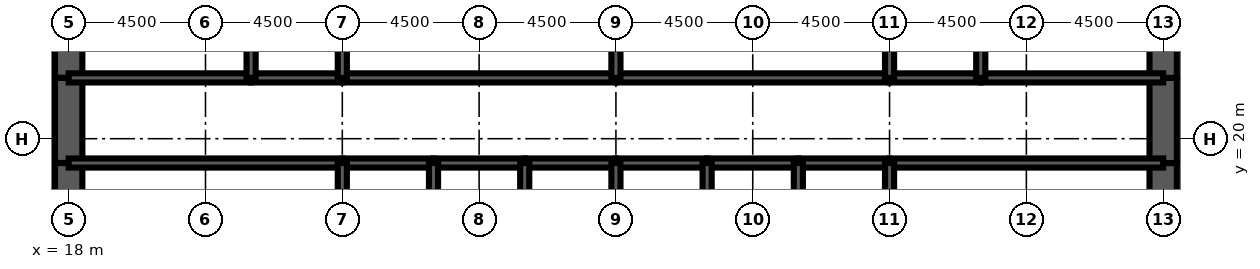
"""IFC4 building model, lengths in metres.
Left out: names, types, materials, properties, quantities, classifications, styles, units other than length and angle.
Written with IfcOpenShell. Run it as: python <this file> out.ifc"""

import sys

from ifc_helpers import new_model, si_unit, direction, frame, frame_2d, origin, place, context, subcontext, project, spatial, rectangle, extrude, element, fill, save


model = new_model("IFC4")
c1 = context("Model", 3, precision=1e-05, world=origin(), true_north=direction((0.0, 1.0)))
c2 = subcontext(c1, "Body", "Model", "MODEL_VIEW")
j1 = project(units=[si_unit("LENGTHUNIT", "METRE"), si_unit("PLANEANGLEUNIT", "RADIAN")], contexts=[c1])
p1 = place(None, origin())
s1 = spatial("IfcSite", under=j1, at=p1, CompositionType="ELEMENT")
p2 = place(p1, origin())
s2 = spatial("IfcBuilding", under=s1, at=p2, CompositionType="ELEMENT")
p3 = place(p2, frame((0.0, 0.0, 72.5)))
s3 = spatial("IfcBuildingStorey", under=s2, at=p3, CompositionType="ELEMENT", Elevation=72.5)
p4 = place(p3, frame((18.0, 26.0, 0.0), z_axis=(0.0, 0.0, 1.0), x_axis=(0.0, -1.0, 0.0)))
e1 = element("IfcWall", 1, at=p4, inside=s3, PredefinedType="SHEAR", context=c2, shape_type="SweptSolid", body=[
    extrude(rectangle(XDim=4.0, YDim=0.9, at=frame_2d((2.0, 0.0))), origin(), (0.0, 0.0, 1.0), 4.5),
])
p5 = place(p3, frame((18.0, 22.0, 0.0), z_axis=(0.0, 0.0, 1.0), x_axis=(0.0, -1.0, 0.0)))
e2 = element("IfcWall", 2, at=p5, inside=s3, PredefinedType="SHEAR", context=c2, shape_type="SweptSolid", body=[
    extrude(rectangle(XDim=2.8, YDim=0.9, at=frame_2d((1.4, 0.0))), origin(), (0.0, 0.0, 1.0), 4.5),
])
p6 = place(p5, frame((0.6, 0.0, 0.0)))
e3 = element("IfcOpeningElement", 3, at=p6, cuts=e2, PredefinedType="OPENING", context=c2, shape_type="SweptSolid", body=[
    extrude(rectangle(XDim=1.8, YDim=2.1, at=frame_2d((0.9, 1.05))), frame((0.0, 0.46, 0.0), z_axis=(0.0, -1.0, 0.0), x_axis=(1.0, 0.0, 0.0)), (0.0, 0.0, 1.0), 0.92),
])
for number, where, z_axis, x_axis in (
    (4, (18.0, 19.2, 0.0), (0.0, 0.0, 1.0), (0.0, -1.0, 0.0)),
    (5, (54.0, 16.0, 0.0), (0.0, 0.0, 1.0), (0.0, 1.0, 0.0)),
):
    element("IfcWall", number, at=place(p3, frame(where, z_axis=z_axis, x_axis=x_axis)), inside=s3, PredefinedType="SHEAR", context=c2, shape_type="SweptSolid", body=[
        extrude(rectangle(XDim=3.2, YDim=0.9, at=frame_2d((1.6, 0.0))), origin(), (0.0, 0.0, 1.0), 4.5),
    ])
p7 = place(p3, frame((54.0, 19.2, 0.0), z_axis=(0.0, 0.0, 1.0), x_axis=(0.0, 1.0, 0.0)))
e6 = element("IfcWall", 6, at=p7, inside=s3, PredefinedType="SHEAR", context=c2, shape_type="SweptSolid", body=[
    extrude(rectangle(XDim=2.8, YDim=0.9, at=frame_2d((1.4, 0.0))), origin(), (0.0, 0.0, 1.0), 4.5),
])
p8 = place(p7, frame((0.4, 0.0, 0.0)))
e7 = element("IfcOpeningElement", 7, at=p8, cuts=e6, PredefinedType="OPENING", context=c2, shape_type="SweptSolid", body=[
    extrude(rectangle(XDim=1.8, YDim=2.1, at=frame_2d((0.9, 1.05))), frame((0.0, 0.46, 0.0), z_axis=(0.0, -1.0, 0.0), x_axis=(1.0, 0.0, 0.0)), (0.0, 0.0, 1.0), 0.92),
])
p9 = place(p3, frame((54.0, 22.0, 0.0), z_axis=(0.0, 0.0, 1.0), x_axis=(0.0, 1.0, 0.0)))
e8 = element("IfcWall", 8, at=p9, inside=s3, PredefinedType="SHEAR", context=c2, shape_type="SweptSolid", body=[
    extrude(rectangle(XDim=4.0, YDim=0.9, at=frame_2d((2.0, 0.0))), origin(), (0.0, 0.0, 1.0), 4.5),
])
p10 = place(p3, frame((18.0, 19.2, 0.0), z_axis=(0.0, 0.0, 1.0), x_axis=(1.0, 0.0, 0.0)))
e9 = element("IfcWall", 9, at=p10, inside=s3, PredefinedType="SOLIDWALL", context=c2, shape_type="SweptSolid", body=[
    extrude(rectangle(XDim=9.0, YDim=0.3, at=frame_2d((4.5, 0.0))), origin(), (0.0, 0.0, 1.0), 4.5),
])
p11 = place(p10, frame((0.65, 0.0, 0.0)))
e10 = element("IfcOpeningElement", 10, at=p11, cuts=e9, PredefinedType="OPENING", context=c2, shape_type="SweptSolid", body=[
    extrude(rectangle(XDim=1.0, YDim=2.1, at=frame_2d((0.5, 1.05))), frame((0.0, 0.16, 0.0), z_axis=(0.0, -1.0, 0.0), x_axis=(1.0, 0.0, 0.0)), (0.0, 0.0, 1.0), 0.32),
])
p12 = place(p3, frame((27.0, 19.2, 0.0), z_axis=(0.0, 0.0, 1.0), x_axis=(1.0, 0.0, 0.0)))
e11 = element("IfcWall", 11, at=p12, inside=s3, PredefinedType="SOLIDWALL", context=c2, shape_type="SweptSolid", body=[
    extrude(rectangle(XDim=3.0, YDim=0.3, at=frame_2d((1.5, 0.0))), origin(), (0.0, 0.0, 1.0), 4.5),
])
p13 = place(p12, frame((0.95, 0.0, 0.0)))
e12 = element("IfcOpeningElement", 12, at=p13, cuts=e11, PredefinedType="OPENING", context=c2, shape_type="SweptSolid", body=[
    extrude(rectangle(XDim=1.1, YDim=2.2, at=frame_2d((0.55, 1.1))), frame((0.0, 0.16, 0.0), z_axis=(0.0, -1.0, 0.0), x_axis=(1.0, 0.0, 0.0)), (0.0, 0.0, 1.0), 0.32),
])
p14 = place(p3, frame((30.0, 19.2, 0.0), z_axis=(0.0, 0.0, 1.0), x_axis=(1.0, 0.0, 0.0)))
e13 = element("IfcWall", 13, at=p14, inside=s3, PredefinedType="SOLIDWALL", context=c2, shape_type="SweptSolid", body=[
    extrude(rectangle(XDim=3.0, YDim=0.3, at=frame_2d((1.5, 0.0))), origin(), (0.0, 0.0, 1.0), 4.5),
])
p15 = place(p14, frame((0.95, 0.0, 0.0)))
e14 = element("IfcOpeningElement", 14, at=p15, cuts=e13, PredefinedType="OPENING", context=c2, shape_type="SweptSolid", body=[
    extrude(rectangle(XDim=1.1, YDim=2.2, at=frame_2d((0.55, 1.1))), frame((0.0, 0.16, 0.0), z_axis=(0.0, -1.0, 0.0), x_axis=(1.0, 0.0, 0.0)), (0.0, 0.0, 1.0), 0.32),
])
p16 = place(p3, frame((33.0, 19.2, 0.0), z_axis=(0.0, 0.0, 1.0), x_axis=(1.0, 0.0, 0.0)))
e15 = element("IfcWall", 15, at=p16, inside=s3, PredefinedType="SOLIDWALL", context=c2, shape_type="SweptSolid", body=[
    extrude(rectangle(XDim=3.0, YDim=0.3, at=frame_2d((1.5, 0.0))), origin(), (0.0, 0.0, 1.0), 4.5),
])
p17 = place(p16, frame((0.95, 0.0, 0.0)))
e16 = element("IfcOpeningElement", 16, at=p17, cuts=e15, PredefinedType="OPENING", context=c2, shape_type="SweptSolid", body=[
    extrude(rectangle(XDim=1.1, YDim=2.2, at=frame_2d((0.55, 1.1))), frame((0.0, 0.16, 0.0), z_axis=(0.0, -1.0, 0.0), x_axis=(1.0, 0.0, 0.0)), (0.0, 0.0, 1.0), 0.32),
])
p18 = place(p3, frame((36.0, 19.2, 0.0), z_axis=(0.0, 0.0, 1.0), x_axis=(1.0, 0.0, 0.0)))
e17 = element("IfcWall", 17, at=p18, inside=s3, PredefinedType="SOLIDWALL", context=c2, shape_type="SweptSolid", body=[
    extrude(rectangle(XDim=3.0, YDim=0.3, at=frame_2d((1.5, 0.0))), origin(), (0.0, 0.0, 1.0), 4.5),
])
p19 = place(p18, frame((0.95, 0.0, 0.0)))
e18 = element("IfcOpeningElement", 18, at=p19, cuts=e17, PredefinedType="OPENING", context=c2, shape_type="SweptSolid", body=[
    extrude(rectangle(XDim=1.1, YDim=2.2, at=frame_2d((0.55, 1.1))), frame((0.0, 0.16, 0.0), z_axis=(0.0, -1.0, 0.0), x_axis=(1.0, 0.0, 0.0)), (0.0, 0.0, 1.0), 0.32),
])
for number, where, z_axis, x_axis in (
    (19, (39.0, 19.2, 0.0), (0.0, 0.0, 1.0), (1.0, 0.0, 0.0)),
    (20, (42.0, 19.2, 0.0), (0.0, 0.0, 1.0), (1.0, 0.0, 0.0)),
):
    element("IfcWall", number, at=place(p3, frame(where, z_axis=z_axis, x_axis=x_axis)), inside=s3, PredefinedType="SOLIDWALL", context=c2, shape_type="SweptSolid", body=[
        extrude(rectangle(XDim=3.0, YDim=0.3, at=frame_2d((1.5, 0.0))), origin(), (0.0, 0.0, 1.0), 4.5),
    ])
p20 = place(p3, frame((45.0, 19.2, 0.0), z_axis=(0.0, 0.0, 1.0), x_axis=(1.0, 0.0, 0.0)))
e21 = element("IfcWall", 21, at=p20, inside=s3, PredefinedType="SOLIDWALL", context=c2, shape_type="SweptSolid", body=[
    extrude(rectangle(XDim=9.0, YDim=0.3, at=frame_2d((4.5, 0.0))), origin(), (0.0, 0.0, 1.0), 4.5),
])
p21 = place(p20, frame((7.35, 0.0, 0.0)))
e22 = element("IfcOpeningElement", 22, at=p21, cuts=e21, PredefinedType="OPENING", context=c2, shape_type="SweptSolid", body=[
    extrude(rectangle(XDim=1.0, YDim=2.1, at=frame_2d((0.5, 1.05))), frame((0.0, 0.16, 0.0), z_axis=(0.0, -1.0, 0.0), x_axis=(1.0, 0.0, 0.0)), (0.0, 0.0, 1.0), 0.32),
])
p22 = place(p3, frame((18.0, 22.0, 0.0), z_axis=(0.0, 0.0, 1.0), x_axis=(1.0, 0.0, 0.0)))
e23 = element("IfcWall", 23, at=p22, inside=s3, PredefinedType="SOLIDWALL", context=c2, shape_type="SweptSolid", body=[
    extrude(rectangle(XDim=6.0, YDim=0.3, at=frame_2d((3.0, 0.0))), origin(), (0.0, 0.0, 1.0), 4.5),
])
p23 = place(p22, frame((4.4, 0.0, 0.0)))
e24 = element("IfcOpeningElement", 24, at=p23, cuts=e23, PredefinedType="OPENING", context=c2, shape_type="SweptSolid", body=[
    extrude(rectangle(XDim=1.0, YDim=2.1, at=frame_2d((0.5, 1.05))), frame((0.0, 0.16, 0.0), z_axis=(0.0, -1.0, 0.0), x_axis=(1.0, 0.0, 0.0)), (0.0, 0.0, 1.0), 0.32),
])
p24 = place(p22, frame((0.85, 0.0, 0.0)))
e25 = element("IfcOpeningElement", 25, at=p24, cuts=e23, PredefinedType="OPENING", context=c2, shape_type="SweptSolid", body=[
    extrude(rectangle(XDim=1.0, YDim=2.1, at=frame_2d((0.5, 1.05))), frame((0.0, 0.16, 0.0), z_axis=(0.0, -1.0, 0.0), x_axis=(1.0, 0.0, 0.0)), (0.0, 0.0, 1.0), 0.32),
])
p25 = place(p3, frame((24.0, 22.0, 0.0), z_axis=(0.0, 0.0, 1.0), x_axis=(1.0, 0.0, 0.0)))
e26 = element("IfcWall", 26, at=p25, inside=s3, PredefinedType="SOLIDWALL", context=c2, shape_type="SweptSolid", body=[
    extrude(rectangle(XDim=3.0, YDim=0.3, at=frame_2d((1.5, 0.0))), origin(), (0.0, 0.0, 1.0), 4.5),
])
p26 = place(p25, frame((1.0, 0.0, 0.0)))
e27 = element("IfcOpeningElement", 27, at=p26, cuts=e26, PredefinedType="OPENING", context=c2, shape_type="SweptSolid", body=[
    extrude(rectangle(XDim=1.0, YDim=2.1, at=frame_2d((0.5, 1.05))), frame((0.0, 0.16, 0.0), z_axis=(0.0, -1.0, 0.0), x_axis=(1.0, 0.0, 0.0)), (0.0, 0.0, 1.0), 0.32),
])
p27 = place(p3, frame((27.0, 22.0, 0.0), z_axis=(0.0, 0.0, 1.0), x_axis=(1.0, 0.0, 0.0)))
e28 = element("IfcWall", 28, at=p27, inside=s3, PredefinedType="SOLIDWALL", context=c2, shape_type="SweptSolid", body=[
    extrude(rectangle(XDim=9.0, YDim=0.3, at=frame_2d((4.5, 0.0))), origin(), (0.0, 0.0, 1.0), 4.5),
])
p28 = place(p27, frame((4.0, 0.0, 0.0)))
e29 = element("IfcOpeningElement", 29, at=p28, cuts=e28, PredefinedType="OPENING", context=c2, shape_type="SweptSolid", body=[
    extrude(rectangle(XDim=1.0, YDim=2.1, at=frame_2d((0.5, 1.05))), frame((0.0, 0.16, 0.0), z_axis=(0.0, -1.0, 0.0), x_axis=(1.0, 0.0, 0.0)), (0.0, 0.0, 1.0), 0.32),
])
p29 = place(p3, frame((36.0, 22.0, 0.0), z_axis=(0.0, 0.0, 1.0), x_axis=(1.0, 0.0, 0.0)))
e30 = element("IfcWall", 30, at=p29, inside=s3, PredefinedType="SOLIDWALL", context=c2, shape_type="SweptSolid", body=[
    extrude(rectangle(XDim=9.0, YDim=0.3, at=frame_2d((4.5, 0.0))), origin(), (0.0, 0.0, 1.0), 4.5),
])
p30 = place(p29, frame((4.0, 0.0, 0.0)))
e31 = element("IfcOpeningElement", 31, at=p30, cuts=e30, PredefinedType="OPENING", context=c2, shape_type="SweptSolid", body=[
    extrude(rectangle(XDim=1.0, YDim=2.1, at=frame_2d((0.5, 1.05))), frame((0.0, 0.16, 0.0), z_axis=(0.0, -1.0, 0.0), x_axis=(1.0, 0.0, 0.0)), (0.0, 0.0, 1.0), 0.32),
])
p31 = place(p3, frame((45.0, 22.0, 0.0), z_axis=(0.0, 0.0, 1.0), x_axis=(1.0, 0.0, 0.0)))
e32 = element("IfcWall", 32, at=p31, inside=s3, PredefinedType="SOLIDWALL", context=c2, shape_type="SweptSolid", body=[
    extrude(rectangle(XDim=3.0, YDim=0.3, at=frame_2d((1.5, 0.0))), origin(), (0.0, 0.0, 1.0), 4.5),
])
p32 = place(p31, frame((1.0, 0.0, 0.0)))
e33 = element("IfcOpeningElement", 33, at=p32, cuts=e32, PredefinedType="OPENING", context=c2, shape_type="SweptSolid", body=[
    extrude(rectangle(XDim=1.0, YDim=2.1, at=frame_2d((0.5, 1.05))), frame((0.0, 0.16, 0.0), z_axis=(0.0, -1.0, 0.0), x_axis=(1.0, 0.0, 0.0)), (0.0, 0.0, 1.0), 0.32),
])
p33 = place(p3, frame((48.0, 22.0, 0.0), z_axis=(0.0, 0.0, 1.0), x_axis=(1.0, 0.0, 0.0)))
e34 = element("IfcWall", 34, at=p33, inside=s3, PredefinedType="SOLIDWALL", context=c2, shape_type="SweptSolid", body=[
    extrude(rectangle(XDim=6.0, YDim=0.3, at=frame_2d((3.0, 0.0))), origin(), (0.0, 0.0, 1.0), 4.5),
])
p34 = place(p33, frame((2.0, 0.0, 0.0)))
e35 = element("IfcOpeningElement", 35, at=p34, cuts=e34, PredefinedType="OPENING", context=c2, shape_type="SweptSolid", body=[
    extrude(rectangle(XDim=1.0, YDim=2.1, at=frame_2d((0.5, 1.05))), frame((0.0, 0.16, 0.0), z_axis=(0.0, -1.0, 0.0), x_axis=(1.0, 0.0, 0.0)), (0.0, 0.0, 1.0), 0.32),
])
p35 = place(p33, frame((4.3, 0.0, 0.0)))
e36 = element("IfcOpeningElement", 36, at=p35, cuts=e34, PredefinedType="OPENING", context=c2, shape_type="SweptSolid", body=[
    extrude(rectangle(XDim=1.0, YDim=2.1, at=frame_2d((0.5, 1.05))), frame((0.0, 0.16, 0.0), z_axis=(0.0, -1.0, 0.0), x_axis=(1.0, 0.0, 0.0)), (0.0, 0.0, 1.0), 0.32),
])
for number, where, z_axis, x_axis in (
    (37, (27.0, 16.0, 0.0), (0.0, 0.0, 1.0), (0.0, 1.0, 0.0)),
    (38, (30.0, 16.0, 0.0), (0.0, 0.0, 1.0), (0.0, 1.0, 0.0)),
    (39, (33.0, 16.0, 0.0), (0.0, 0.0, 1.0), (0.0, 1.0, 0.0)),
    (40, (36.0, 16.0, 0.0), (0.0, 0.0, 1.0), (0.0, 1.0, 0.0)),
    (41, (39.0, 16.0, 0.0), (0.0, 0.0, 1.0), (0.0, 1.0, 0.0)),
    (42, (42.0, 16.0, 0.0), (0.0, 0.0, 1.0), (0.0, 1.0, 0.0)),
    (43, (45.0, 16.0, 0.0), (0.0, 0.0, 1.0), (0.0, 1.0, 0.0)),
):
    element("IfcWall", number, at=place(p3, frame(where, z_axis=z_axis, x_axis=x_axis)), inside=s3, PredefinedType="SOLIDWALL", context=c2, shape_type="SweptSolid", body=[
        extrude(rectangle(XDim=3.2, YDim=0.3, at=frame_2d((1.6, 0.0))), origin(), (0.0, 0.0, 1.0), 4.5),
    ])
for number, where, z_axis, x_axis in (
    (44, (24.0, 22.0, 0.0), (0.0, 0.0, 1.0), (0.0, 1.0, 0.0)),
    (45, (27.0, 22.0, 0.0), (0.0, 0.0, 1.0), (0.0, 1.0, 0.0)),
    (46, (36.0, 22.0, 0.0), (0.0, 0.0, 1.0), (0.0, 1.0, 0.0)),
    (47, (45.0, 22.0, 0.0), (0.0, 0.0, 1.0), (0.0, 1.0, 0.0)),
    (48, (48.0, 22.0, 0.0), (0.0, 0.0, 1.0), (0.0, 1.0, 0.0)),
):
    element("IfcWall", number, at=place(p3, frame(where, z_axis=z_axis, x_axis=x_axis)), inside=s3, PredefinedType="SOLIDWALL", context=c2, shape_type="SweptSolid", body=[
        extrude(rectangle(XDim=4.0, YDim=0.3, at=frame_2d((2.0, 0.0))), origin(), (0.0, 0.0, 1.0), 4.5),
    ])
p36 = place(p3, frame((42.5, 22.15, 0.0), z_axis=(0.0, 0.0, 1.0), x_axis=(0.0, 1.0, 0.0)))
e49 = element("IfcWall", 49, at=p36, inside=s3, PredefinedType="PARTITIONING", context=c2, shape_type="SweptSolid", body=[
    extrude(rectangle(XDim=3.7, YDim=0.15, at=frame_2d((1.85, 0.0))), origin(), (0.0, 0.0, 1.0), 3.0),
])
p37 = place(p36, frame((2.2, 0.0, 0.0)))
e50 = element("IfcOpeningElement", 50, at=p37, cuts=e49, PredefinedType="OPENING", context=c2, shape_type="SweptSolid", body=[
    extrude(rectangle(XDim=1.0, YDim=2.1, at=frame_2d((0.5, 1.05))), frame((0.0, 0.085, 0.0), z_axis=(0.0, -1.0, 0.0), x_axis=(1.0, 0.0, 0.0)), (0.0, 0.0, 1.0), 0.17),
])
for number, where, z_axis, x_axis in (
    (51, (20.325, 22.15, 0.0), (0.0, 0.0, 1.0), (0.0, 1.0, 0.0)),
    (52, (51.975, 22.15, 0.0), (0.0, 0.0, 1.0), (0.0, 1.0, 0.0)),
):
    element("IfcWall", number, at=place(p3, frame(where, z_axis=z_axis, x_axis=x_axis)), inside=s3, PredefinedType="PARTITIONING", context=c2, shape_type="SweptSolid", body=[
        extrude(rectangle(XDim=3.7, YDim=0.15, at=frame_2d((1.85, 0.0))), origin(), (0.0, 0.0, 1.0), 3.0),
    ])
p38 = place(p3, frame((24.5, 19.35, 0.0), z_axis=(0.0, 0.0, 1.0), x_axis=(0.0, 1.0, 0.0)))
e53 = element("IfcWall", 53, at=p38, inside=s3, PredefinedType="PARTITIONING", context=c2, shape_type="SweptSolid", body=[
    extrude(rectangle(XDim=2.5, YDim=0.15, at=frame_2d((1.25, 0.0))), origin(), (0.0, 0.0, 1.0), 3.0),
])
p39 = place(p38, frame((1.15, 0.0, 0.0)))
e54 = element("IfcOpeningElement", 54, at=p39, cuts=e53, PredefinedType="OPENING", context=c2, shape_type="SweptSolid", body=[
    extrude(rectangle(XDim=1.0, YDim=2.1, at=frame_2d((0.5, 1.05))), frame((0.0, 0.085, 0.0), z_axis=(0.0, -1.0, 0.0), x_axis=(1.0, 0.0, 0.0)), (0.0, 0.0, 1.0), 0.17),
])
p40 = place(p39, origin())
e55 = element("IfcDoor", 55, at=p40, inside=s3, OperationType="SINGLE_SWING_RIGHT", PredefinedType="DOOR", context=c2, shape_type="SweptSolid", body=[
    extrude(rectangle(XDim=1.0, YDim=2.1, at=frame_2d((0.5, 1.05))), frame((0.0, 0.025, 0.0), z_axis=(0.0, -1.0, 0.0), x_axis=(1.0, 0.0, 0.0)), (0.0, 0.0, 1.0), 0.05),
])
fill(e54, e55)
p41 = place(p13, origin())
e56 = element("IfcDoor", 56, at=p41, inside=s3, OperationType="DOUBLE_DOOR_SLIDING", PredefinedType="USERDEFINED", context=c2, shape_type="SweptSolid", body=[
    extrude(rectangle(XDim=1.1, YDim=2.2, at=frame_2d((0.55, 1.1))), frame((0.0, 0.025, 0.0), z_axis=(0.0, -1.0, 0.0), x_axis=(1.0, 0.0, 0.0)), (0.0, 0.0, 1.0), 0.05),
])
fill(e12, e56)
p42 = place(p15, origin())
e57 = element("IfcDoor", 57, at=p42, inside=s3, OperationType="DOUBLE_DOOR_SLIDING", PredefinedType="USERDEFINED", context=c2, shape_type="SweptSolid", body=[
    extrude(rectangle(XDim=1.1, YDim=2.2, at=frame_2d((0.55, 1.1))), frame((0.0, 0.025, 0.0), z_axis=(0.0, -1.0, 0.0), x_axis=(1.0, 0.0, 0.0)), (0.0, 0.0, 1.0), 0.05),
])
fill(e14, e57)
p43 = place(p17, origin())
e58 = element("IfcDoor", 58, at=p43, inside=s3, OperationType="DOUBLE_DOOR_SLIDING", PredefinedType="USERDEFINED", context=c2, shape_type="SweptSolid", body=[
    extrude(rectangle(XDim=1.1, YDim=2.2, at=frame_2d((0.55, 1.1))), frame((0.0, 0.025, 0.0), z_axis=(0.0, -1.0, 0.0), x_axis=(1.0, 0.0, 0.0)), (0.0, 0.0, 1.0), 0.05),
])
fill(e16, e58)
p44 = place(p19, origin())
e59 = element("IfcDoor", 59, at=p44, inside=s3, OperationType="DOUBLE_DOOR_SLIDING", PredefinedType="USERDEFINED", context=c2, shape_type="SweptSolid", body=[
    extrude(rectangle(XDim=1.1, YDim=2.2, at=frame_2d((0.55, 1.1))), frame((0.0, 0.025, 0.0), z_axis=(0.0, -1.0, 0.0), x_axis=(1.0, 0.0, 0.0)), (0.0, 0.0, 1.0), 0.05),
])
fill(e18, e59)
p45 = place(p11, origin())
e60 = element("IfcDoor", 60, at=p45, inside=s3, OperationType="SINGLE_SWING_LEFT", PredefinedType="DOOR", context=c2, shape_type="SweptSolid", body=[
    extrude(rectangle(XDim=1.0, YDim=2.1, at=frame_2d((0.5, 1.05))), frame((0.0, 0.025, 0.0), z_axis=(0.0, -1.0, 0.0), x_axis=(1.0, 0.0, 0.0)), (0.0, 0.0, 1.0), 0.05),
])
fill(e10, e60)
p46 = place(p21, origin())
e61 = element("IfcDoor", 61, at=p46, inside=s3, OperationType="SINGLE_SWING_RIGHT", PredefinedType="DOOR", context=c2, shape_type="SweptSolid", body=[
    extrude(rectangle(XDim=1.0, YDim=2.1, at=frame_2d((0.5, 1.05))), frame((0.0, 0.025, 0.0), z_axis=(0.0, -1.0, 0.0), x_axis=(1.0, 0.0, 0.0)), (0.0, 0.0, 1.0), 0.05),
])
fill(e22, e61)
p47 = place(p6, origin())
e62 = element("IfcDoor", 62, at=p47, inside=s3, OperationType="SINGLE_SWING_LEFT", PredefinedType="DOOR", context=c2, shape_type="SweptSolid", body=[
    extrude(rectangle(XDim=1.8, YDim=2.1, at=frame_2d((0.9, 1.05))), frame((0.0, 0.45, 0.0), z_axis=(0.0, -1.0, 0.0), x_axis=(1.0, 0.0, 0.0)), (0.0, 0.0, 1.0), 0.899),
])
fill(e3, e62)
p48 = place(p8, origin())
e63 = element("IfcDoor", 63, at=p48, inside=s3, OperationType="SINGLE_SWING_LEFT", PredefinedType="DOOR", context=c2, shape_type="SweptSolid", body=[
    extrude(rectangle(XDim=1.8, YDim=2.1, at=frame_2d((0.9, 1.05))), frame((0.0, 0.45, 0.0), z_axis=(0.0, -1.0, 0.0), x_axis=(1.0, 0.0, 0.0)), (0.0, 0.0, 1.0), 0.899),
])
fill(e7, e63)
p49 = place(p23, origin())
e64 = element("IfcDoor", 64, at=p49, inside=s3, OperationType="SINGLE_SWING_RIGHT", PredefinedType="DOOR", context=c2, shape_type="SweptSolid", body=[
    extrude(rectangle(XDim=1.0, YDim=2.1, at=frame_2d((0.5, 1.05))), frame((0.0, 0.025, 0.0), z_axis=(0.0, -1.0, 0.0), x_axis=(1.0, 0.0, 0.0)), (0.0, 0.0, 1.0), 0.05),
])
fill(e24, e64)
p50 = place(p26, origin())
e65 = element("IfcDoor", 65, at=p50, inside=s3, OperationType="SINGLE_SWING_LEFT", PredefinedType="DOOR", context=c2, shape_type="SweptSolid", body=[
    extrude(rectangle(XDim=1.0, YDim=2.1, at=frame_2d((0.5, 1.05))), frame((0.0, 0.025, 0.0), z_axis=(0.0, -1.0, 0.0), x_axis=(1.0, 0.0, 0.0)), (0.0, 0.0, 1.0), 0.05),
])
fill(e27, e65)
p51 = place(p28, origin())
e66 = element("IfcDoor", 66, at=p51, inside=s3, OperationType="SINGLE_SWING_LEFT", PredefinedType="DOOR", context=c2, shape_type="SweptSolid", body=[
    extrude(rectangle(XDim=1.0, YDim=2.1, at=frame_2d((0.5, 1.05))), frame((0.0, 0.025, 0.0), z_axis=(0.0, -1.0, 0.0), x_axis=(1.0, 0.0, 0.0)), (0.0, 0.0, 1.0), 0.05),
])
fill(e29, e66)
p52 = place(p30, origin())
e67 = element("IfcDoor", 67, at=p52, inside=s3, OperationType="SINGLE_SWING_LEFT", PredefinedType="DOOR", context=c2, shape_type="SweptSolid", body=[
    extrude(rectangle(XDim=1.0, YDim=2.1, at=frame_2d((0.5, 1.05))), frame((0.0, 0.025, 0.0), z_axis=(0.0, -1.0, 0.0), x_axis=(1.0, 0.0, 0.0)), (0.0, 0.0, 1.0), 0.05),
])
fill(e31, e67)
p53 = place(p32, origin())
e68 = element("IfcDoor", 68, at=p53, inside=s3, OperationType="SINGLE_SWING_LEFT", PredefinedType="DOOR", context=c2, shape_type="SweptSolid", body=[
    extrude(rectangle(XDim=1.0, YDim=2.1, at=frame_2d((0.5, 1.05))), frame((0.0, 0.025, 0.0), z_axis=(0.0, -1.0, 0.0), x_axis=(1.0, 0.0, 0.0)), (0.0, 0.0, 1.0), 0.05),
])
fill(e33, e68)
p54 = place(p34, origin())
e69 = element("IfcDoor", 69, at=p54, inside=s3, OperationType="SINGLE_SWING_LEFT", PredefinedType="DOOR", context=c2, shape_type="SweptSolid", body=[
    extrude(rectangle(XDim=1.0, YDim=2.1, at=frame_2d((0.5, 1.05))), frame((0.0, 0.025, 0.0), z_axis=(0.0, -1.0, 0.0), x_axis=(1.0, 0.0, 0.0)), (0.0, 0.0, 1.0), 0.05),
])
fill(e35, e69)
p55 = place(p24, origin())
e70 = element("IfcDoor", 70, at=p55, inside=s3, OperationType="SINGLE_SWING_LEFT", PredefinedType="DOOR", context=c2, shape_type="SweptSolid", body=[
    extrude(rectangle(XDim=1.0, YDim=2.1, at=frame_2d((0.5, 1.05))), frame((0.0, 0.025, 0.0), z_axis=(0.0, -1.0, 0.0), x_axis=(1.0, 0.0, 0.0)), (0.0, 0.0, 1.0), 0.05),
])
fill(e25, e70)
p56 = place(p35, origin())
e71 = element("IfcDoor", 71, at=p56, inside=s3, OperationType="SINGLE_SWING_RIGHT", PredefinedType="DOOR", context=c2, shape_type="SweptSolid", body=[
    extrude(rectangle(XDim=1.0, YDim=2.1, at=frame_2d((0.5, 1.05))), frame((0.0, 0.025, 0.0), z_axis=(0.0, -1.0, 0.0), x_axis=(1.0, 0.0, 0.0)), (0.0, 0.0, 1.0), 0.05),
])
fill(e36, e71)
save(model, sys.argv[1])
